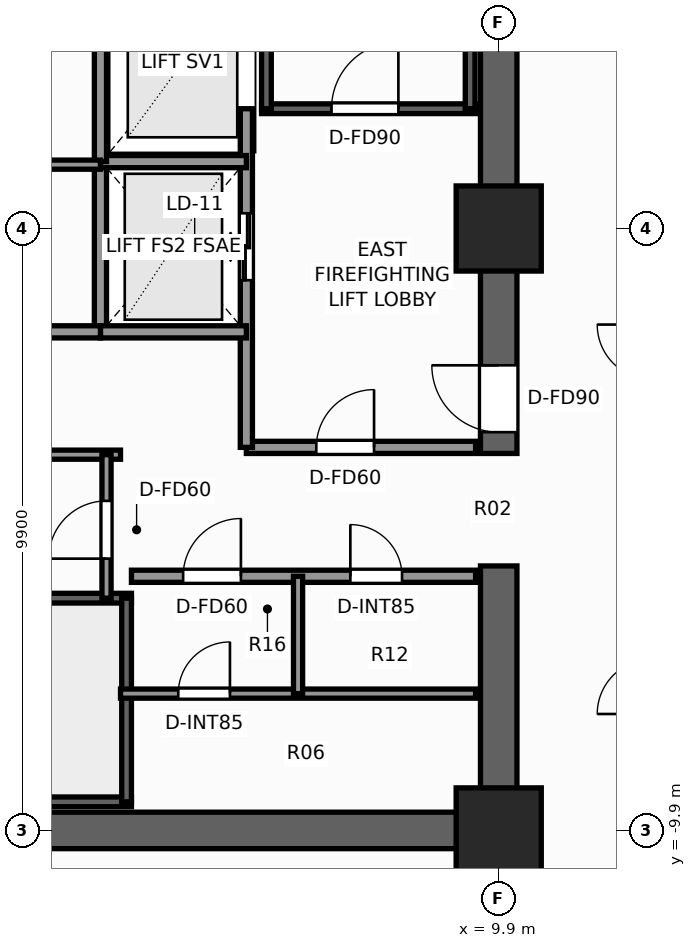
"""IFC4 building model, lengths in metres.
Left out: names, types, materials, properties, quantities, classifications, styles, units other than length and angle.
Written with IfcOpenShell. Run it as: python <this file> out.ifc"""

import sys

from ifc_helpers import new_model, si_unit, direction, frame, frame_2d, origin, origin_2d, place, context, subcontext, project, spatial, rectangle, extrude, element, fill, save


model = new_model("IFC4")
c1 = context("Model", 3, precision=1e-05, world=origin(), true_north=direction((0.0, 1.0)))
c2 = subcontext(c1, "Body", "Model", "MODEL_VIEW")
j1 = project(units=[si_unit("LENGTHUNIT", "METRE"), si_unit("PLANEANGLEUNIT", "RADIAN")], contexts=[c1])
p1 = place(None, origin())
s1 = spatial("IfcSite", under=j1, at=p1, CompositionType="ELEMENT")
p2 = place(p1, origin())
s2 = spatial("IfcBuilding", under=s1, at=p2, CompositionType="ELEMENT")
p3 = place(p2, frame((0.0, 0.0, 37.0)))
s3 = spatial("IfcBuildingStorey", under=s2, at=p3, CompositionType="ELEMENT", Elevation=37.0)
p4 = place(p3, frame((10.2, -9.9, 0.0), z_axis=(0.0, 0.0, 1.0), x_axis=(-1.0, 0.0, 0.0)))
e1 = element("IfcWall", 1, at=p4, inside=s3, PredefinedType="SHEAR", context=c2, shape_type="SweptSolid", body=[
    extrude(rectangle(XDim=12.06, YDim=0.6, at=frame_2d((6.03, 0.0))), origin(), (0.0, 0.0, 1.0), 3.3),
])
p5 = place(p3, frame((9.9, -9.6, 0.0), z_axis=(0.0, 0.0, 1.0), x_axis=(0.0, 1.0, 0.0)))
e2 = element("IfcWall", 2, at=p5, inside=s3, PredefinedType="SHEAR", context=c2, shape_type="SweptSolid", body=[
    extrude(rectangle(XDim=4.05, YDim=0.6, at=frame_2d((2.025, 0.0))), origin(), (0.0, 0.0, 1.0), 3.3),
])
p6 = place(p3, frame((9.9, -3.7, 0.0), z_axis=(0.0, 0.0, 1.0), x_axis=(0.0, 1.0, 0.0)))
e3 = element("IfcWall", 3, at=p6, inside=s3, PredefinedType="SHEAR", context=c2, shape_type="SweptSolid", body=[
    extrude(rectangle(XDim=13.3, YDim=0.6, at=frame_2d((6.65, 0.0))), origin(), (0.0, 0.0, 1.0), 3.3),
])
p7 = place(p6, frame((0.35, 0.0, 0.0)))
e4 = element("IfcOpeningElement", 4, at=p7, cuts=e3, PredefinedType="OPENING", context=c2, shape_type="SweptSolid", body=[
    extrude(rectangle(XDim=1.1, YDim=2.2, at=frame_2d((0.55, 1.1))), frame((0.0, 0.31, 0.0), z_axis=(0.0, -1.0, 0.0), x_axis=(1.0, 0.0, 0.0)), (0.0, 0.0, 1.0), 0.62),
])
for number, where, z_axis, x_axis in (
    (5, (9.9, -9.9, 0.0), (0.0, 0.0, 1.0), (1.0, 0.0, 0.0)),
    (6, (9.9, 0.0, 0.0), (0.0, 0.0, 1.0), (1.0, 0.0, 0.0)),
):
    element("IfcColumn", number, at=place(p3, frame(where, z_axis=z_axis, x_axis=x_axis)), inside=s3, PredefinedType="COLUMN", context=c2, shape_type="SweptSolid", body=[
        extrude(rectangle(XDim=1.4, YDim=1.4, at=origin_2d()), origin(), (0.0, 0.0, 1.0), 3.3),
    ])
p8 = place(p3, frame((6.0, 1.97, 0.0), z_axis=(0.0, 0.0, 1.0), x_axis=(1.0, 0.0, 0.0)))
e7 = element("IfcWall", 7, at=p8, inside=s3, PredefinedType="SHEAR", context=c2, shape_type="SweptSolid", body=[
    extrude(rectangle(XDim=3.52, YDim=0.16, at=frame_2d((1.76, 0.0))), origin(), (0.0, 0.0, 1.0), 3.3),
])
p9 = place(p8, frame((1.15, 0.0, 0.0)))
e8 = element("IfcOpeningElement", 8, at=p9, cuts=e7, PredefinedType="OPENING", context=c2, shape_type="SweptSolid", body=[
    extrude(rectangle(XDim=1.1, YDim=2.2, at=frame_2d((0.55, 1.1))), frame((0.0, 0.09, 0.0), z_axis=(0.0, -1.0, 0.0), x_axis=(1.0, 0.0, 0.0)), (0.0, 0.0, 1.0), 0.18),
])
for number, where, z_axis, x_axis in (
    (9, (6.08, 1.97, 0.0), (0.0, 0.0, 1.0), (0.0, 1.0, 0.0)),
    (10, (9.43, 1.97, 0.0), (0.0, 0.0, 1.0), (0.0, 1.0, 0.0)),
):
    element("IfcWall", number, at=place(p3, frame(where, z_axis=z_axis, x_axis=x_axis)), inside=s3, PredefinedType="SHEAR", context=c2, shape_type="SweptSolid", body=[
        extrude(rectangle(XDim=7.56, YDim=0.16, at=frame_2d((3.78, 0.0))), origin(), (0.0, 0.0, 1.0), 3.3),
    ])
p10 = place(p3, frame((3.86, -9.43, 0.0), z_axis=(0.0, 0.0, 1.0), x_axis=(-1.0, 0.0, 0.0)))
e11 = element("IfcWall", 11, at=p10, inside=s3, PredefinedType="SHEAR", context=c2, shape_type="SweptSolid", body=[
    extrude(rectangle(XDim=7.72, YDim=0.16, at=frame_2d((3.86, 0.0))), origin(), (0.0, 0.0, 1.0), 3.3),
])
p11 = place(p10, frame((6.01, 0.0, 0.0)))
e12 = element("IfcOpeningElement", 12, at=p11, cuts=e11, PredefinedType="OPENING", context=c2, shape_type="SweptSolid", body=[
    extrude(rectangle(XDim=1.1, YDim=2.2, at=frame_2d((0.55, 1.1))), frame((0.0, 0.09, 0.0), z_axis=(0.0, -1.0, 0.0), x_axis=(1.0, 0.0, 0.0)), (0.0, 0.0, 1.0), 0.18),
])
p12 = place(p3, frame((-3.86, -6.08, 0.0), z_axis=(0.0, 0.0, 1.0), x_axis=(1.0, 0.0, 0.0)))
e13 = element("IfcWall", 13, at=p12, inside=s3, PredefinedType="SHEAR", context=c2, shape_type="SweptSolid", body=[
    extrude(rectangle(XDim=7.72, YDim=0.16, at=frame_2d((3.86, 0.0))), origin(), (0.0, 0.0, 1.0), 3.3),
])
p13 = place(p3, frame((3.78, -9.43, 0.0), z_axis=(0.0, 0.0, 1.0), x_axis=(0.0, 1.0, 0.0)))
e14 = element("IfcWall", 14, at=p13, inside=s3, PredefinedType="SHEAR", context=c2, shape_type="SweptSolid", body=[
    extrude(rectangle(XDim=3.35, YDim=0.16, at=frame_2d((1.675, 0.0))), origin(), (0.0, 0.0, 1.0), 3.3),
])
p14 = place(p3, frame((5.75, -3.6, 0.0), z_axis=(0.0, 0.0, 1.0), x_axis=(1.0, 0.0, 0.0)))
e15 = element("IfcWall", 15, at=p14, inside=s3, PredefinedType="SOLIDWALL", context=c2, shape_type="SweptSolid", body=[
    extrude(rectangle(XDim=3.77, YDim=0.2, at=frame_2d((1.885, 0.0))), origin(), (0.0, 0.0, 1.0), 3.06),
])
p15 = place(p14, frame((1.15, 0.0, 0.0)))
e16 = element("IfcOpeningElement", 16, at=p15, cuts=e15, PredefinedType="OPENING", context=c2, shape_type="SweptSolid", body=[
    extrude(rectangle(XDim=0.95, YDim=2.06, at=frame_2d((0.475, 1.03))), frame((0.0, 0.11, 0.0), z_axis=(0.0, -1.0, 0.0), x_axis=(1.0, 0.0, 0.0)), (0.0, 0.0, 1.0), 0.22),
])
p16 = place(p3, frame((5.75, -3.6, 0.0), z_axis=(0.0, 0.0, 1.0), x_axis=(0.0, 1.0, 0.0)))
e17 = element("IfcWall", 17, at=p16, inside=s3, PredefinedType="SOLIDWALL", context=c2, shape_type="SweptSolid", body=[
    extrude(rectangle(XDim=5.57, YDim=0.2, at=frame_2d((2.785, 0.0))), origin(), (0.0, 0.0, 1.0), 3.06),
])
p17 = place(p16, frame((2.75, 0.0, 0.0)))
e18 = element("IfcOpeningElement", 18, at=p17, cuts=e17, PredefinedType="OPENING", context=c2, shape_type="SweptSolid", body=[
    extrude(rectangle(XDim=1.1, YDim=2.2, at=frame_2d((0.55, 1.1))), frame((0.0, 0.11, 0.0), z_axis=(0.0, -1.0, 0.0), x_axis=(1.0, 0.0, 0.0)), (0.0, 0.0, 1.0), 0.22),
])
p18 = place(p3, frame((3.35, -1.7, 0.0), z_axis=(0.0, 0.0, 1.0), x_axis=(0.0, 1.0, 0.0)))
e19 = element("IfcWall", 19, at=p18, inside=s3, PredefinedType="SOLIDWALL", context=c2, shape_type="SweptSolid", body=[
    extrude(rectangle(XDim=2.8, YDim=0.2, at=frame_2d((1.4, 0.0))), origin(), (0.0, 0.0, 1.0), 3.06),
])
for number, where, z_axis, x_axis in (
    (20, (3.35, -1.7, 0.0), (0.0, 0.0, 1.0), (1.0, 0.0, 0.0)),
    (21, (3.35, 1.1, 0.0), (0.0, 0.0, 1.0), (1.0, 0.0, 0.0)),
):
    element("IfcWall", number, at=place(p3, frame(where, z_axis=z_axis, x_axis=x_axis)), inside=s3, PredefinedType="SOLIDWALL", context=c2, shape_type="SweptSolid", body=[
        extrude(rectangle(XDim=2.4, YDim=0.2, at=frame_2d((1.2, 0.0))), origin(), (0.0, 0.0, 1.0), 3.06),
    ])
p19 = place(p3, frame((3.86, -5.72, 0.0), z_axis=(0.0, 0.0, 1.0), x_axis=(1.0, 0.0, 0.0)))
e22 = element("IfcWall", 22, at=p19, inside=s3, PredefinedType="SOLIDWALL", context=c2, shape_type="SweptSolid", body=[
    extrude(rectangle(XDim=5.66, YDim=0.2, at=frame_2d((2.83, 0.0))), origin(), (0.0, 0.0, 1.0), 3.06),
])
p20 = place(p19, frame((0.85, 0.0, 0.0)))
e23 = element("IfcOpeningElement", 23, at=p20, cuts=e22, PredefinedType="OPENING", context=c2, shape_type="SweptSolid", body=[
    extrude(rectangle(XDim=0.95, YDim=2.06, at=frame_2d((0.475, 1.03))), frame((0.0, 0.11, 0.0), z_axis=(0.0, -1.0, 0.0), x_axis=(1.0, 0.0, 0.0)), (0.0, 0.0, 1.0), 0.22),
])
p21 = place(p19, frame((3.6, 0.0, 0.0)))
e24 = element("IfcOpeningElement", 24, at=p21, cuts=e22, PredefinedType="OPENING", context=c2, shape_type="SweptSolid", body=[
    extrude(rectangle(XDim=0.85, YDim=2.03, at=frame_2d((0.425, 1.015))), frame((0.0, 0.11, 0.0), z_axis=(0.0, -1.0, 0.0), x_axis=(1.0, 0.0, 0.0)), (0.0, 0.0, 1.0), 0.22),
])
p22 = place(p3, frame((3.68, -7.65, 0.0), z_axis=(0.0, 0.0, 1.0), x_axis=(1.0, 0.0, 0.0)))
e25 = element("IfcWall", 25, at=p22, inside=s3, PredefinedType="PARTITIONING", context=c2, shape_type="SweptSolid", body=[
    extrude(rectangle(XDim=5.84, YDim=0.15, at=frame_2d((2.92, 0.0))), origin(), (0.0, 0.0, 1.0), 3.06),
])
p23 = place(p22, frame((0.95, 0.0, 0.0)))
e26 = element("IfcOpeningElement", 26, at=p23, cuts=e25, PredefinedType="OPENING", context=c2, shape_type="SweptSolid", body=[
    extrude(rectangle(XDim=0.85, YDim=2.03, at=frame_2d((0.425, 1.015))), frame((0.0, 0.085, 0.0), z_axis=(0.0, -1.0, 0.0), x_axis=(1.0, 0.0, 0.0)), (0.0, 0.0, 1.0), 0.17),
])
p24 = place(p3, frame((6.6, -7.65, 0.0), z_axis=(0.0, 0.0, 1.0), x_axis=(0.0, 1.0, 0.0)))
e27 = element("IfcWall", 27, at=p24, inside=s3, PredefinedType="PARTITIONING", context=c2, shape_type="SweptSolid", body=[
    extrude(rectangle(XDim=1.93, YDim=0.15, at=frame_2d((0.965, 0.0))), origin(), (0.0, 0.0, 1.0), 3.06),
])
p25 = place(p3, frame((-3.35, -1.7, 0.0), z_axis=(0.0, 0.0, 1.0), x_axis=(1.0, 0.0, 0.0)))
e28 = element("IfcWall", 28, at=p25, inside=s3, PredefinedType="SOLIDWALL", context=c2, shape_type="SweptSolid", body=[
    extrude(rectangle(XDim=6.7, YDim=0.2, at=frame_2d((3.35, 0.0))), origin(), (0.0, 0.0, 1.0), 3.06),
])
p26 = place(p3, frame((3.35, 1.1, 0.0), z_axis=(0.0, 0.0, 1.0), x_axis=(0.0, 1.0, 0.0)))
e29 = element("IfcWall", 29, at=p26, inside=s3, PredefinedType="SOLIDWALL", context=c2, shape_type="SweptSolid", body=[
    extrude(rectangle(XDim=3.2, YDim=0.2, at=frame_2d((1.6, 0.0))), origin(), (0.0, 0.0, 1.0), 3.06),
])
p27 = place(p3, frame((-3.35, 1.05, 0.0), z_axis=(0.0, 0.0, 1.0), x_axis=(1.0, 0.0, 0.0)))
e30 = element("IfcWall", 30, at=p27, inside=s3, PredefinedType="PARTITIONING", context=c2, shape_type="SweptSolid", body=[
    extrude(rectangle(XDim=6.7, YDim=0.15, at=frame_2d((3.35, 0.0))), origin(), (0.0, 0.0, 1.0), 3.06),
])
p28 = place(p27, frame((4.2, 0.0, 0.0)))
e31 = element("IfcOpeningElement", 31, at=p28, cuts=e30, PredefinedType="OPENING", context=c2, shape_type="SweptSolid", body=[
    extrude(rectangle(XDim=0.85, YDim=2.03, at=frame_2d((0.425, 1.015))), frame((0.0, 0.085, 0.0), z_axis=(0.0, -1.0, 0.0), x_axis=(1.0, 0.0, 0.0)), (0.0, 0.0, 1.0), 0.17),
])
p29 = place(p3, frame((-3.68, -3.72, 0.0), z_axis=(0.0, 0.0, 1.0), x_axis=(1.0, 0.0, 0.0)))
e32 = element("IfcWall", 32, at=p29, inside=s3, PredefinedType="PARTITIONING", context=c2, shape_type="SweptSolid", body=[
    extrude(rectangle(XDim=7.36, YDim=0.15, at=frame_2d((3.68, 0.0))), origin(), (0.0, 0.0, 1.0), 3.06),
])
p30 = place(p3, frame((3.45, -6.08, 0.0), z_axis=(0.0, 0.0, 1.0), x_axis=(0.0, 1.0, 0.0)))
e33 = element("IfcWall", 33, at=p30, inside=s3, PredefinedType="PARTITIONING", context=c2, shape_type="SweptSolid", body=[
    extrude(rectangle(XDim=2.36, YDim=0.15, at=frame_2d((1.18, 0.0))), origin(), (0.0, 0.0, 1.0), 3.06),
])
p31 = place(p30, frame((0.65, 0.0, 0.0)))
e34 = element("IfcOpeningElement", 34, at=p31, cuts=e33, PredefinedType="OPENING", context=c2, shape_type="SweptSolid", body=[
    extrude(rectangle(XDim=0.95, YDim=2.06, at=frame_2d((0.475, 1.03))), frame((0.0, 0.085, 0.0), z_axis=(0.0, -1.0, 0.0), x_axis=(1.0, 0.0, 0.0)), (0.0, 0.0, 1.0), 0.17),
])
p32 = place(p9, origin())
e35 = element("IfcDoor", 35, at=p32, inside=s3, OperationType="SINGLE_SWING_RIGHT", PredefinedType="DOOR", context=c2, shape_type="SweptSolid", body=[
    extrude(rectangle(XDim=1.1, YDim=2.2, at=frame_2d((0.55, 1.1))), frame((0.0, 0.025, 0.0), z_axis=(0.0, -1.0, 0.0), x_axis=(1.0, 0.0, 0.0)), (0.0, 0.0, 1.0), 0.05),
])
fill(e8, e35)
p33 = place(p7, origin())
e36 = element("IfcDoor", 36, at=p33, inside=s3, OperationType="SINGLE_SWING_RIGHT", PredefinedType="DOOR", context=c2, shape_type="SweptSolid", body=[
    extrude(rectangle(XDim=1.1, YDim=2.2, at=frame_2d((0.55, 1.1))), frame((0.0, 0.025, 0.0), z_axis=(0.0, -1.0, 0.0), x_axis=(1.0, 0.0, 0.0)), (0.0, 0.0, 1.0), 0.05),
])
fill(e4, e36)
p34 = place(p17, origin())
e37 = element("IfcDoor", 37, at=p34, inside=s3, OperationType="DOUBLE_DOOR_SLIDING", PredefinedType="DOOR", context=c2, shape_type="SweptSolid", body=[
    extrude(rectangle(XDim=1.1, YDim=2.2, at=frame_2d((0.55, 1.1))), frame((0.0, 0.025, 0.0), z_axis=(0.0, -1.0, 0.0), x_axis=(1.0, 0.0, 0.0)), (0.0, 0.0, 1.0), 0.05),
])
fill(e18, e37)
p35 = place(p20, origin())
e38 = element("IfcDoor", 38, at=p35, inside=s3, OperationType="SINGLE_SWING_RIGHT", PredefinedType="DOOR", context=c2, shape_type="SweptSolid", body=[
    extrude(rectangle(XDim=0.95, YDim=2.06, at=frame_2d((0.475, 1.03))), frame((0.0, 0.025, 0.0), z_axis=(0.0, -1.0, 0.0), x_axis=(1.0, 0.0, 0.0)), (0.0, 0.0, 1.0), 0.05),
])
fill(e23, e38)
p36 = place(p21, origin())
e39 = element("IfcDoor", 39, at=p36, inside=s3, OperationType="SINGLE_SWING_LEFT", PredefinedType="DOOR", context=c2, shape_type="SweptSolid", body=[
    extrude(rectangle(XDim=0.85, YDim=2.03, at=frame_2d((0.425, 1.015))), frame((0.0, 0.025, 0.0), z_axis=(0.0, -1.0, 0.0), x_axis=(1.0, 0.0, 0.0)), (0.0, 0.0, 1.0), 0.05),
])
fill(e24, e39)
p37 = place(p23, origin())
e40 = element("IfcDoor", 40, at=p37, inside=s3, OperationType="SINGLE_SWING_RIGHT", PredefinedType="DOOR", context=c2, shape_type="SweptSolid", body=[
    extrude(rectangle(XDim=0.85, YDim=2.03, at=frame_2d((0.425, 1.015))), frame((0.0, 0.025, 0.0), z_axis=(0.0, -1.0, 0.0), x_axis=(1.0, 0.0, 0.0)), (0.0, 0.0, 1.0), 0.05),
])
fill(e26, e40)
p38 = place(p15, origin())
e41 = element("IfcDoor", 41, at=p38, inside=s3, OperationType="SINGLE_SWING_RIGHT", PredefinedType="DOOR", context=c2, shape_type="SweptSolid", body=[
    extrude(rectangle(XDim=0.95, YDim=2.06, at=frame_2d((0.475, 1.03))), frame((0.0, 0.025, 0.0), z_axis=(0.0, -1.0, 0.0), x_axis=(1.0, 0.0, 0.0)), (0.0, 0.0, 1.0), 0.05),
])
fill(e16, e41)
p39 = place(p31, origin())
e42 = element("IfcDoor", 42, at=p39, inside=s3, OperationType="SINGLE_SWING_LEFT", PredefinedType="DOOR", context=c2, shape_type="SweptSolid", body=[
    extrude(rectangle(XDim=0.95, YDim=2.06, at=frame_2d((0.475, 1.03))), frame((0.0, 0.025, 0.0), z_axis=(0.0, -1.0, 0.0), x_axis=(1.0, 0.0, 0.0)), (0.0, 0.0, 1.0), 0.05),
])
fill(e34, e42)
save(model, sys.argv[1])
